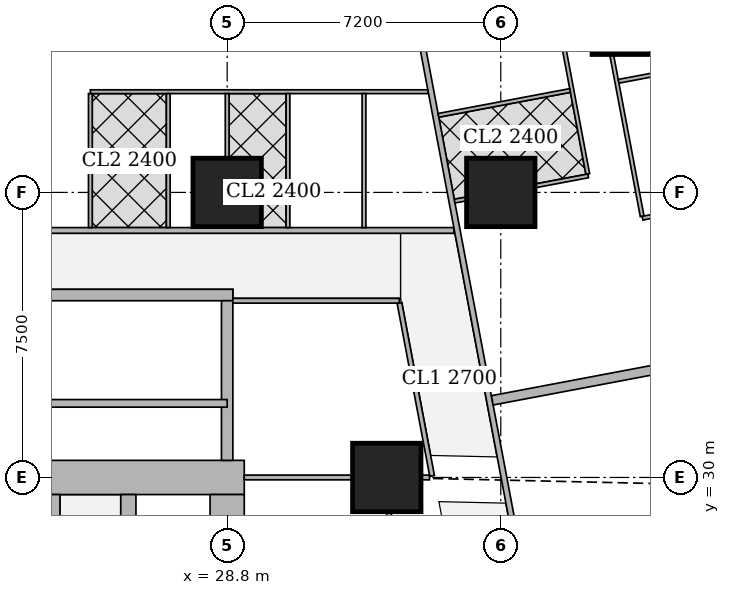
"""IFC4 building model, lengths in metres.
Left out: names, types, materials, properties, quantities, classifications, styles, units other than length and angle.
Written with IfcOpenShell. Run it as: python <this file> out.ifc"""

import sys

from ifc_helpers import new_model, si_unit, direction, frame, frame_2d, origin, origin_2d, place, context, subcontext, project, spatial, rectangle, extrude, element, fill, save


model = new_model("IFC4")
c1 = context("Model", 3, precision=1e-05, world=origin(), true_north=direction((0.0, 1.0)))
c2 = subcontext(c1, "Body", "Model", "MODEL_VIEW")
j1 = project(units=[si_unit("LENGTHUNIT", "METRE"), si_unit("PLANEANGLEUNIT", "RADIAN")], contexts=[c1])
p1 = place(None, origin())
s1 = spatial("IfcSite", under=j1, at=p1, CompositionType="ELEMENT")
p2 = place(p1, origin())
s2 = spatial("IfcBuilding", under=s1, at=p2, CompositionType="ELEMENT")
p3 = place(p2, frame((0.0, 0.0, 20.0)))
s3 = spatial("IfcBuildingStorey", under=s2, at=p3, CompositionType="ELEMENT", Elevation=20.0)
for number, where, z_axis, x_axis in (
    (1, (33.0, 30.0, 0.0), (0.0, 0.0, 1.0), (1.0, 0.0, 0.0)),
    (2, (28.8, 37.5, 0.0), (0.0, 0.0, 1.0), (1.0, 0.0, 0.0)),
    (3, (36.0, 37.5, 0.0), (0.0, 0.0, 1.0), (1.0, 0.0, 0.0)),
):
    element("IfcColumn", number, at=place(p3, frame(where, z_axis=z_axis, x_axis=x_axis)), inside=s3, PredefinedType="COLUMN", context=c2, shape_type="SweptSolid", body=[
        extrude(rectangle(XDim=1.8, YDim=1.8, at=origin_2d()), origin(), (0.0, 0.0, 1.0), 3.75),
    ])
p4 = place(p3, frame((40.102, 42.83, 0.0), z_axis=(0.0, 0.0, 1.0), x_axis=(1.0, 0.0, 0.0)))
e4 = element("IfcColumn", 4, at=p4, inside=s3, PredefinedType="COLUMN", context=c2, shape_type="SweptSolid", body=[
    extrude(rectangle(XDim=3.4, YDim=3.4, at=origin_2d()), origin(), (0.0, 0.0, 1.0), 3.75),
])
p5 = place(p3, frame((13.95, 30.0, 0.0), z_axis=(0.0, 0.0, 1.0), x_axis=(1.0, 0.0, 0.0)))
e5 = element("IfcWall", 5, at=p5, inside=s3, PredefinedType="SHEAR", context=c2, shape_type="SweptSolid", body=[
    extrude(rectangle(XDim=15.3, YDim=0.9, at=frame_2d((7.65, 0.0))), origin(), (0.0, 0.0, 1.0), 3.75),
])
p6 = place(p5, frame((4.45, 0.0, 0.0)))
e6 = element("IfcOpeningElement", 6, at=p6, cuts=e5, PredefinedType="OPENING", context=c2, shape_type="SweptSolid", body=[
    extrude(rectangle(XDim=1.8, YDim=2.1, at=frame_2d((0.9, 1.05))), frame((0.0, 0.46, 0.0), z_axis=(0.0, -1.0, 0.0), x_axis=(1.0, 0.0, 0.0)), (0.0, 0.0, 1.0), 0.92),
])
p7 = place(p5, frame((10.7, 0.0, 0.0)))
e7 = element("IfcOpeningElement", 7, at=p7, cuts=e5, PredefinedType="OPENING", context=c2, shape_type="SweptSolid", body=[
    extrude(rectangle(XDim=1.1, YDim=2.1, at=frame_2d((0.55, 1.05))), frame((0.0, 0.46, 0.0), z_axis=(0.0, -1.0, 0.0), x_axis=(1.0, 0.0, 0.0)), (0.0, 0.0, 1.0), 0.92),
])
p8 = place(p3, frame((28.8, 15.45, 0.0), z_axis=(0.0, 0.0, 1.0), x_axis=(0.0, 1.0, 0.0)))
e8 = element("IfcWall", 8, at=p8, inside=s3, PredefinedType="SHEAR", context=c2, shape_type="SweptSolid", body=[
    extrude(rectangle(XDim=14.1, YDim=0.9, at=frame_2d((7.05, 0.0))), origin(), (0.0, 0.0, 1.0), 3.75),
])
p9 = place(p3, frame((24.2, 15.45, 0.0), z_axis=(0.0, 0.0, 1.0), x_axis=(0.0, 1.0, 0.0)))
e9 = element("IfcWall", 9, at=p9, inside=s3, PredefinedType="SHEAR", context=c2, shape_type="SweptSolid", body=[
    extrude(rectangle(XDim=14.1, YDim=0.4, at=frame_2d((7.05, 0.0))), origin(), (0.0, 0.0, 1.0), 3.75),
])
p10 = place(p3, frame((26.2, 26.45, 0.0), z_axis=(0.0, 0.0, 1.0), x_axis=(0.0, 1.0, 0.0)))
e10 = element("IfcWall", 10, at=p10, inside=s3, PredefinedType="SHEAR", context=c2, shape_type="SweptSolid", body=[
    extrude(rectangle(XDim=3.1, YDim=0.4, at=frame_2d((1.55, 0.0))), origin(), (0.0, 0.0, 1.0), 3.75),
])
p11 = place(p10, frame((1.075, 0.0, 0.0)))
e11 = element("IfcOpeningElement", 11, at=p11, cuts=e10, PredefinedType="OPENING", context=c2, shape_type="SweptSolid", body=[
    extrude(rectangle(XDim=1.2, YDim=2.1, at=frame_2d((0.6, 1.05))), frame((0.0, 0.21, 0.0), z_axis=(0.0, -1.0, 0.0), x_axis=(1.0, 0.0, 0.0)), (0.0, 0.0, 1.0), 0.42),
])
p12 = place(p3, frame((21.45, 34.8, 0.0), z_axis=(0.0, 0.0, 1.0), x_axis=(1.0, 0.0, 0.0)))
e12 = element("IfcWall", 12, at=p12, inside=s3, PredefinedType="SHEAR", context=c2, shape_type="SweptSolid", body=[
    extrude(rectangle(XDim=7.5, YDim=0.3, at=frame_2d((3.75, 0.0))), origin(), (0.0, 0.0, 1.0), 3.75),
])
p13 = place(p12, frame((0.5, 0.0, 0.0)))
e13 = element("IfcOpeningElement", 13, at=p13, cuts=e12, PredefinedType="OPENING", context=c2, shape_type="SweptSolid", body=[
    extrude(rectangle(XDim=1.1, YDim=2.1, at=frame_2d((0.55, 1.05))), frame((0.0, 0.16, 0.0), z_axis=(0.0, -1.0, 0.0), x_axis=(1.0, 0.0, 0.0)), (0.0, 0.0, 1.0), 0.32),
])
p14 = place(p3, frame((28.8, 30.45, 0.0), z_axis=(0.0, 0.0, 1.0), x_axis=(0.0, 1.0, 0.0)))
e14 = element("IfcWall", 14, at=p14, inside=s3, PredefinedType="SHEAR", context=c2, shape_type="SweptSolid", body=[
    extrude(rectangle(XDim=4.2, YDim=0.3, at=frame_2d((2.1, 0.0))), origin(), (0.0, 0.0, 1.0), 3.75),
])
p15 = place(p3, frame((8.35, 36.5, 0.0), z_axis=(0.0, 0.0, 1.0), x_axis=(1.0, 0.0, 0.0)))
e15 = element("IfcWall", 15, at=p15, inside=s3, PredefinedType="SOLIDWALL", context=c2, shape_type="SweptSolid", body=[
    extrude(rectangle(XDim=26.415, YDim=0.15, at=frame_2d((13.208, 0.0))), origin(), (0.0, 0.0, 1.0), 3.5),
])
p16 = place(p15, frame((3.383, 0.0, 0.0)))
e16 = element("IfcOpeningElement", 16, at=p16, cuts=e15, PredefinedType="OPENING", context=c2, shape_type="SweptSolid", body=[
    extrude(rectangle(XDim=1.0, YDim=2.1, at=frame_2d((0.5, 1.05))), frame((0.0, 0.085, 0.0), z_axis=(0.0, -1.0, 0.0), x_axis=(1.0, 0.0, 0.0)), (0.0, 0.0, 1.0), 0.17),
])
p17 = place(p15, frame((7.65, 0.0, 0.0)))
e17 = element("IfcOpeningElement", 17, at=p17, cuts=e15, PredefinedType="OPENING", context=c2, shape_type="SweptSolid", body=[
    extrude(rectangle(XDim=1.0, YDim=2.1, at=frame_2d((0.5, 1.05))), frame((0.0, 0.085, 0.0), z_axis=(0.0, -1.0, 0.0), x_axis=(1.0, 0.0, 0.0)), (0.0, 0.0, 1.0), 0.17),
])
p18 = place(p15, frame((14.857, 0.0, 0.0)))
e18 = element("IfcOpeningElement", 18, at=p18, cuts=e15, PredefinedType="OPENING", context=c2, shape_type="SweptSolid", body=[
    extrude(rectangle(XDim=1.0, YDim=2.1, at=frame_2d((0.5, 1.05))), frame((0.0, 0.085, 0.0), z_axis=(0.0, -1.0, 0.0), x_axis=(1.0, 0.0, 0.0)), (0.0, 0.0, 1.0), 0.17),
])
p19 = place(p3, frame((33.755, 42.325, 0.0), z_axis=(0.0, 0.0, 1.0), x_axis=(0.185611461091, -0.982623216453, 0.0)))
e19 = element("IfcWall", 19, at=p19, inside=s3, PredefinedType="SOLIDWALL", context=c2, shape_type="SweptSolid", body=[
    extrude(rectangle(XDim=40.241, YDim=0.15, at=frame_2d((20.121, 0.0))), origin(), (0.0, 0.0, 1.0), 2.5),
])
p20 = place(p19, frame((7.325, 0.0, 0.0)))
e20 = element("IfcOpeningElement", 20, at=p20, cuts=e19, PredefinedType="OPENING", context=c2, shape_type="SweptSolid", body=[
    extrude(rectangle(XDim=1.0, YDim=2.1, at=frame_2d((0.5, 1.05))), frame((0.0, 0.085, 0.0), z_axis=(0.0, -1.0, 0.0), x_axis=(1.0, 0.0, 0.0)), (0.0, 0.0, 1.0), 0.17),
])
p21 = place(p19, frame((11.902, 0.0, 0.0)))
e21 = element("IfcOpeningElement", 21, at=p21, cuts=e19, PredefinedType="OPENING", context=c2, shape_type="SweptSolid", body=[
    extrude(rectangle(XDim=1.0, YDim=2.1, at=frame_2d((0.5, 1.05))), frame((0.0, 0.085, 0.0), z_axis=(0.0, -1.0, 0.0), x_axis=(1.0, 0.0, 0.0)), (0.0, 0.0, 1.0), 0.17),
])
p22 = place(p19, frame((25.718, 0.0, 0.0)))
e22 = element("IfcOpeningElement", 22, at=p22, cuts=e19, PredefinedType="OPENING", context=c2, shape_type="SweptSolid", body=[
    extrude(rectangle(XDim=1.0, YDim=2.1, at=frame_2d((0.5, 1.05))), frame((0.0, 0.085, 0.0), z_axis=(0.0, -1.0, 0.0), x_axis=(1.0, 0.0, 0.0)), (0.0, 0.0, 1.0), 0.17),
])
p23 = place(p19, frame((31.788, 0.0, 0.0)))
e23 = element("IfcOpeningElement", 23, at=p23, cuts=e19, PredefinedType="OPENING", context=c2, shape_type="SweptSolid", body=[
    extrude(rectangle(XDim=1.0, YDim=2.1, at=frame_2d((0.5, 1.05))), frame((0.0, 0.085, 0.0), z_axis=(0.0, -1.0, 0.0), x_axis=(1.0, 0.0, 0.0)), (0.0, 0.0, 1.0), 0.17),
])
p24 = place(p3, frame((38.918, 41.12, 0.0), z_axis=(0.0, 0.0, 1.0), x_axis=(0.185474723155, -0.982649035552, 0.0)))
e24 = element("IfcWall", 24, at=p24, inside=s3, PredefinedType="PARTITIONING", context=c2, shape_type="SweptSolid", body=[
    extrude(rectangle(XDim=4.324, YDim=0.1, at=frame_2d((2.162, 0.0))), origin(), (0.0, 0.0, 1.0), 3.5),
])
p25 = place(p24, frame((1.6, 0.0, 0.0)))
e25 = element("IfcOpeningElement", 25, at=p25, cuts=e24, PredefinedType="OPENING", context=c2, shape_type="SweptSolid", body=[
    extrude(rectangle(XDim=0.9, YDim=2.1, at=frame_2d((0.45, 1.05))), frame((0.0, 0.06, 0.0), z_axis=(0.0, -1.0, 0.0), x_axis=(1.0, 0.0, 0.0)), (0.0, 0.0, 1.0), 0.12),
])
p26 = place(p3, frame((37.457, 42.39, 0.0), z_axis=(0.0, 0.0, 1.0), x_axis=(0.185560627322, -0.982632817276, 0.0)))
e26 = element("IfcWall", 26, at=p26, inside=s3, PredefinedType="PARTITIONING", context=c2, shape_type="SweptSolid", body=[
    extrude(rectangle(XDim=4.484, YDim=0.1, at=frame_2d((2.242, 0.0))), origin(), (0.0, 0.0, 1.0), 3.5),
])
p27 = place(p26, frame((2.936, 0.0, 0.0)))
e27 = element("IfcOpeningElement", 27, at=p27, cuts=e26, PredefinedType="OPENING", context=c2, shape_type="SweptSolid", body=[
    extrude(rectangle(XDim=0.9, YDim=2.1, at=frame_2d((0.45, 1.05))), frame((0.0, 0.06, 0.0), z_axis=(0.0, -1.0, 0.0), x_axis=(1.0, 0.0, 0.0)), (0.0, 0.0, 1.0), 0.12),
])
p28 = place(p3, frame((43.277, 41.212, 0.0), z_axis=(0.0, 0.0, 1.0), x_axis=(-0.982665405803, -0.185387972203, 0.0)))
e28 = element("IfcWall", 28, at=p28, inside=s3, PredefinedType="PARTITIONING", context=c2, shape_type="SweptSolid", body=[
    extrude(rectangle(XDim=4.25, YDim=0.1, at=frame_2d((2.125, 0.0))), origin(), (0.0, 0.0, 1.0), 2.1),
])
p29 = place(p3, frame((40.454, 36.959, 0.0), z_axis=(0.0, 0.0, 1.0), x_axis=(-0.982578421631, -0.185848447247, 0.0)))
e29 = element("IfcWall", 29, at=p29, inside=s3, PredefinedType="PARTITIONING", context=c2, shape_type="SweptSolid", body=[
    extrude(rectangle(XDim=0.737, YDim=0.1, at=frame_2d((0.369, 0.0))), origin(), (0.0, 0.0, 1.0), 3.5),
])
p30 = place(p3, frame((37.823, 40.182, 0.0), z_axis=(0.0, 0.0, 1.0), x_axis=(-0.98263926043, -0.185526504472, 0.0)))
e30 = element("IfcWall", 30, at=p30, inside=s3, PredefinedType="PARTITIONING", context=c2, shape_type="SweptSolid", body=[
    extrude(rectangle(XDim=3.524, YDim=0.1, at=frame_2d((1.762, 0.0))), origin(), (0.0, 0.0, 1.0), 3.5),
])
p31 = place(p3, frame((38.299, 37.935, 0.0), z_axis=(0.0, 0.0, 1.0), x_axis=(-0.982680053146, -0.185310315822, 0.0)))
e31 = element("IfcWall", 31, at=p31, inside=s3, PredefinedType="PARTITIONING", context=c2, shape_type="SweptSolid", body=[
    extrude(rectangle(XDim=1.414, YDim=0.1, at=frame_2d((0.707, 0.0))), origin(), (0.0, 0.0, 1.0), 3.5),
])
p32 = place(p3, frame((35.09, 37.328, 0.0), z_axis=(0.0, 0.0, 1.0), x_axis=(-0.982961380226, -0.183812200315, 0.0)))
e32 = element("IfcWall", 32, at=p32, inside=s3, PredefinedType="PARTITIONING", context=c2, shape_type="SweptSolid", body=[
    extrude(rectangle(XDim=0.31, YDim=0.1, at=frame_2d((0.155, 0.0))), origin(), (0.0, 0.0, 1.0), 3.5),
])
p33 = place(p3, frame((40.468, 32.915, 0.0), z_axis=(0.0, 0.0, 1.0), x_axis=(-0.982635807605, -0.185544791394, 0.0)))
e33 = element("IfcWall", 33, at=p33, inside=s3, PredefinedType="SOLIDWALL", context=c2, shape_type="SweptSolid", body=[
    extrude(rectangle(XDim=4.775, YDim=0.25, at=frame_2d((2.388, 0.0))), origin(), (0.0, 0.0, 1.0), 3.5),
])
p34 = place(p3, frame((25.2, 40.15, 0.0), z_axis=(0.0, 0.0, 1.0), x_axis=(1.0, 0.0, 0.0)))
e34 = element("IfcWall", 34, at=p34, inside=s3, PredefinedType="PARTITIONING", context=c2, shape_type="SweptSolid", body=[
    extrude(rectangle(XDim=8.88, YDim=0.1, at=frame_2d((4.44, 0.0))), origin(), (0.0, 0.0, 1.0), 3.5),
])
p35 = place(p34, frame((0.575, 0.0, 0.0)))
e35 = element("IfcOpeningElement", 35, at=p35, cuts=e34, PredefinedType="OPENING", context=c2, shape_type="SweptSolid", body=[
    extrude(rectangle(XDim=0.9, YDim=2.1, at=frame_2d((0.45, 1.05))), frame((0.0, 0.06, 0.0), z_axis=(0.0, -1.0, 0.0), x_axis=(1.0, 0.0, 0.0)), (0.0, 0.0, 1.0), 0.12),
])
p36 = place(p34, frame((3.95, 0.0, 0.0)))
e36 = element("IfcOpeningElement", 36, at=p36, cuts=e34, PredefinedType="OPENING", context=c2, shape_type="SweptSolid", body=[
    extrude(rectangle(XDim=0.9, YDim=2.1, at=frame_2d((0.45, 1.05))), frame((0.0, 0.06, 0.0), z_axis=(0.0, -1.0, 0.0), x_axis=(1.0, 0.0, 0.0)), (0.0, 0.0, 1.0), 0.12),
])
p37 = place(p34, frame((7.83, 0.0, 0.0)))
e37 = element("IfcOpeningElement", 37, at=p37, cuts=e34, PredefinedType="OPENING", context=c2, shape_type="SweptSolid", body=[
    extrude(rectangle(XDim=0.9, YDim=2.1, at=frame_2d((0.45, 1.05))), frame((0.0, 0.06, 0.0), z_axis=(0.0, -1.0, 0.0), x_axis=(1.0, 0.0, 0.0)), (0.0, 0.0, 1.0), 0.12),
])
p38 = place(p34, frame((2.375, 0.0, 0.0)))
e38 = element("IfcOpeningElement", 38, at=p38, cuts=e34, PredefinedType="OPENING", context=c2, shape_type="SweptSolid", body=[
    extrude(rectangle(XDim=0.9, YDim=2.1, at=frame_2d((0.45, 1.05))), frame((0.0, 0.06, 0.0), z_axis=(0.0, -1.0, 0.0), x_axis=(1.0, 0.0, 0.0)), (0.0, 0.0, 1.0), 0.12),
])
p39 = place(p34, frame((5.75, 0.0, 0.0)))
e39 = element("IfcOpeningElement", 39, at=p39, cuts=e34, PredefinedType="OPENING", context=c2, shape_type="SweptSolid", body=[
    extrude(rectangle(XDim=0.9, YDim=2.1, at=frame_2d((0.45, 1.05))), frame((0.0, 0.06, 0.0), z_axis=(0.0, -1.0, 0.0), x_axis=(1.0, 0.0, 0.0)), (0.0, 0.0, 1.0), 0.12),
])
p40 = place(p3, frame((25.2, 36.575, 0.0), z_axis=(0.0, 0.0, 1.0), x_axis=(0.0, 1.0, 0.0)))
e40 = element("IfcWall", 40, at=p40, inside=s3, PredefinedType="PARTITIONING", context=c2, shape_type="SweptSolid", body=[
    extrude(rectangle(XDim=3.525, YDim=0.1, at=frame_2d((1.763, 0.0))), origin(), (0.0, 0.0, 1.0), 3.5),
])
p41 = place(p3, frame((28.8, 38.401, 0.0), z_axis=(0.0, 0.0, 1.0), x_axis=(0.0, 1.0, 0.0)))
e41 = element("IfcWall", 41, at=p41, inside=s3, PredefinedType="PARTITIONING", context=c2, shape_type="SweptSolid", body=[
    extrude(rectangle(XDim=1.699, YDim=0.1, at=frame_2d((0.85, 0.0))), origin(), (0.0, 0.0, 1.0), 3.5),
])
for number, where, z_axis, x_axis in (
    (42, (32.4, 36.575, 0.0), (0.0, 0.0, 1.0), (0.0, 1.0, 0.0)),
    (43, (27.25, 36.575, 0.0), (0.0, 0.0, 1.0), (0.0, 1.0, 0.0)),
    (44, (30.4, 36.575, 0.0), (0.0, 0.0, 1.0), (0.0, 1.0, 0.0)),
):
    element("IfcWall", number, at=place(p3, frame(where, z_axis=z_axis, x_axis=x_axis)), inside=s3, PredefinedType="PARTITIONING", context=c2, shape_type="SweptSolid", body=[
        extrude(rectangle(XDim=3.525, YDim=0.1, at=frame_2d((1.763, 0.0))), origin(), (0.0, 0.0, 1.0), 3.5),
    ])
p42 = place(p3, frame((28.95, 34.65, 0.0), z_axis=(0.0, 0.0, 1.0), x_axis=(1.0, 0.0, 0.0)))
e45 = element("IfcWall", 45, at=p42, inside=s3, PredefinedType="PARTITIONING", context=c2, shape_type="SweptSolid", body=[
    extrude(rectangle(XDim=4.381, YDim=0.125, at=frame_2d((2.19, 0.0))), origin(), (0.0, 0.0, 1.0), 3.5),
])
p43 = place(p3, frame((34.193, 30.04, 0.0), z_axis=(0.0, 0.0, 1.0), x_axis=(-0.185626015863, 0.982620467034, 0.0)))
e46 = element("IfcWall", 46, at=p43, inside=s3, PredefinedType="PARTITIONING", context=c2, shape_type="SweptSolid", body=[
    extrude(rectangle(XDim=4.628, YDim=0.125, at=frame_2d((2.314, 0.0))), origin(), (0.0, 0.0, 1.0), 2.5),
])
p44 = place(p43, frame((1.15, 0.0, 0.0)))
e47 = element("IfcOpeningElement", 47, at=p44, cuts=e46, PredefinedType="OPENING", context=c2, shape_type="SweptSolid", body=[
    extrude(rectangle(XDim=1.0, YDim=2.1, at=frame_2d((0.5, 1.05))), frame((0.0, 0.073, 0.0), z_axis=(0.0, -1.0, 0.0), x_axis=(1.0, 0.0, 0.0)), (0.0, 0.0, 1.0), 0.145),
])
p45 = place(p3, frame((34.28, 22.574, 0.0), z_axis=(0.0, 0.0, 1.0), x_axis=(-0.185713862218, 0.982603867986, 0.0)))
e48 = element("IfcWall", 48, at=p45, inside=s3, PredefinedType="PARTITIONING", context=c2, shape_type="SweptSolid", body=[
    extrude(rectangle(XDim=6.628, YDim=0.125, at=frame_2d((3.314, 0.0))), origin(), (0.0, 0.0, 1.0), 2.5),
])
p46 = place(p45, frame((3.241, 0.0, 0.0)))
e49 = element("IfcOpeningElement", 49, at=p46, cuts=e48, PredefinedType="OPENING", context=c2, shape_type="SweptSolid", body=[
    extrude(rectangle(XDim=1.0, YDim=2.1, at=frame_2d((0.5, 1.05))), frame((0.0, 0.073, 0.0), z_axis=(0.0, -1.0, 0.0), x_axis=(1.0, 0.0, 0.0)), (0.0, 0.0, 1.0), 0.145),
])
p47 = place(p3, frame((29.25, 30.0, 0.0), z_axis=(0.0, 0.0, 1.0), x_axis=(1.0, 0.0, 0.0)))
e50 = element("IfcWall", 50, at=p47, inside=s3, PredefinedType="PARTITIONING", context=c2, shape_type="SweptSolid", body=[
    extrude(rectangle(XDim=2.849, YDim=0.125, at=frame_2d((1.425, 0.0))), origin(), (0.0, 0.0, 1.0), 3.5),
])
p48 = place(p3, frame((33.901, 30.0, 0.0), z_axis=(0.0, 0.0, 1.0), x_axis=(1.0, 0.0, 0.0)))
e51 = element("IfcWall", 51, at=p48, inside=s3, PredefinedType="PARTITIONING", context=c2, shape_type="SweptSolid", body=[
    extrude(rectangle(XDim=0.224, YDim=0.125, at=frame_2d((0.112, 0.0))), origin(), (0.0, 0.0, 1.0), 2.5),
])
p49 = place(p3, frame((23.0, 31.95, 0.0), z_axis=(0.0, 0.0, 1.0), x_axis=(1.0, 0.0, 0.0)))
e52 = element("IfcWall", 52, at=p49, inside=s3, PredefinedType="SHEAR", context=c2, shape_type="SweptSolid", body=[
    extrude(rectangle(XDim=5.8, YDim=0.2, at=frame_2d((2.9, 0.0))), origin(), (0.0, 0.0, 1.0), 3.75),
])
p50 = place(p25, origin())
e53 = element("IfcDoor", 53, at=p50, inside=s3, OperationType="SINGLE_SWING_LEFT", PredefinedType="DOOR", context=c2, shape_type="SweptSolid", body=[
    extrude(rectangle(XDim=0.9, YDim=2.1, at=frame_2d((0.45, 1.05))), frame((0.0, 0.025, 0.0), z_axis=(0.0, -1.0, 0.0), x_axis=(1.0, 0.0, 0.0)), (0.0, 0.0, 1.0), 0.05),
])
fill(e25, e53)
p51 = place(p27, origin())
e54 = element("IfcDoor", 54, at=p51, inside=s3, OperationType="SINGLE_SWING_LEFT", PredefinedType="DOOR", context=c2, shape_type="SweptSolid", body=[
    extrude(rectangle(XDim=0.9, YDim=2.1, at=frame_2d((0.45, 1.05))), frame((0.0, 0.025, 0.0), z_axis=(0.0, -1.0, 0.0), x_axis=(1.0, 0.0, 0.0)), (0.0, 0.0, 1.0), 0.05),
])
fill(e27, e54)
p52 = place(p20, origin())
e55 = element("IfcDoor", 55, at=p52, inside=s3, OperationType="SINGLE_SWING_RIGHT", PredefinedType="DOOR", context=c2, shape_type="SweptSolid", body=[
    extrude(rectangle(XDim=1.0, YDim=2.1, at=frame_2d((0.5, 1.05))), frame((0.0, 0.025, 0.0), z_axis=(0.0, -1.0, 0.0), x_axis=(1.0, 0.0, 0.0)), (0.0, 0.0, 1.0), 0.05),
])
fill(e20, e55)
p53 = place(p21, origin())
e56 = element("IfcDoor", 56, at=p53, inside=s3, OperationType="SINGLE_SWING_LEFT", PredefinedType="DOOR", context=c2, shape_type="SweptSolid", body=[
    extrude(rectangle(XDim=1.0, YDim=2.1, at=frame_2d((0.5, 1.05))), frame((0.0, 0.025, 0.0), z_axis=(0.0, -1.0, 0.0), x_axis=(1.0, 0.0, 0.0)), (0.0, 0.0, 1.0), 0.05),
])
fill(e21, e56)
p54 = place(p35, origin())
e57 = element("IfcDoor", 57, at=p54, inside=s3, OperationType="SINGLE_SWING_RIGHT", PredefinedType="DOOR", context=c2, shape_type="SweptSolid", body=[
    extrude(rectangle(XDim=0.9, YDim=2.1, at=frame_2d((0.45, 1.05))), frame((0.0, 0.025, 0.0), z_axis=(0.0, -1.0, 0.0), x_axis=(1.0, 0.0, 0.0)), (0.0, 0.0, 1.0), 0.05),
])
fill(e35, e57)
p55 = place(p36, origin())
e58 = element("IfcDoor", 58, at=p55, inside=s3, OperationType="SINGLE_SWING_LEFT", PredefinedType="DOOR", context=c2, shape_type="SweptSolid", body=[
    extrude(rectangle(XDim=0.9, YDim=2.1, at=frame_2d((0.45, 1.05))), frame((0.0, 0.025, 0.0), z_axis=(0.0, -1.0, 0.0), x_axis=(1.0, 0.0, 0.0)), (0.0, 0.0, 1.0), 0.05),
])
fill(e36, e58)
p56 = place(p37, origin())
e59 = element("IfcDoor", 59, at=p56, inside=s3, OperationType="SINGLE_SWING_LEFT", PredefinedType="DOOR", context=c2, shape_type="SweptSolid", body=[
    extrude(rectangle(XDim=0.9, YDim=2.1, at=frame_2d((0.45, 1.05))), frame((0.0, 0.025, 0.0), z_axis=(0.0, -1.0, 0.0), x_axis=(1.0, 0.0, 0.0)), (0.0, 0.0, 1.0), 0.05),
])
fill(e37, e59)
p57 = place(p38, origin())
e60 = element("IfcDoor", 60, at=p57, inside=s3, OperationType="SINGLE_SWING_RIGHT", PredefinedType="DOOR", context=c2, shape_type="SweptSolid", body=[
    extrude(rectangle(XDim=0.9, YDim=2.1, at=frame_2d((0.45, 1.05))), frame((0.0, 0.025, 0.0), z_axis=(0.0, -1.0, 0.0), x_axis=(1.0, 0.0, 0.0)), (0.0, 0.0, 1.0), 0.05),
])
fill(e38, e60)
p58 = place(p39, origin())
e61 = element("IfcDoor", 61, at=p58, inside=s3, OperationType="SINGLE_SWING_RIGHT", PredefinedType="DOOR", context=c2, shape_type="SweptSolid", body=[
    extrude(rectangle(XDim=0.9, YDim=2.1, at=frame_2d((0.45, 1.05))), frame((0.0, 0.025, 0.0), z_axis=(0.0, -1.0, 0.0), x_axis=(1.0, 0.0, 0.0)), (0.0, 0.0, 1.0), 0.05),
])
fill(e39, e61)
p59 = place(p18, origin())
e62 = element("IfcDoor", 62, at=p59, inside=s3, OperationType="SINGLE_SWING_RIGHT", PredefinedType="DOOR", context=c2, shape_type="SweptSolid", body=[
    extrude(rectangle(XDim=1.0, YDim=2.1, at=frame_2d((0.5, 1.05))), frame((0.0, 0.025, 0.0), z_axis=(0.0, -1.0, 0.0), x_axis=(1.0, 0.0, 0.0)), (0.0, 0.0, 1.0), 0.05),
])
fill(e18, e62)
p60 = place(p44, origin())
e63 = element("IfcDoor", 63, at=p60, inside=s3, OperationType="SINGLE_SWING_LEFT", PredefinedType="DOOR", context=c2, shape_type="SweptSolid", body=[
    extrude(rectangle(XDim=1.0, YDim=2.1, at=frame_2d((0.5, 1.05))), frame((0.0, 0.025, 0.0), z_axis=(0.0, -1.0, 0.0), x_axis=(1.0, 0.0, 0.0)), (0.0, 0.0, 1.0), 0.05),
])
fill(e47, e63)
p61 = place(p7, origin())
e64 = element("IfcDoor", 64, at=p61, inside=s3, OperationType="SINGLE_SWING_RIGHT", PredefinedType="DOOR", context=c2, shape_type="SweptSolid", body=[
    extrude(rectangle(XDim=1.1, YDim=2.1, at=frame_2d((0.55, 1.05))), frame((0.0, 0.025, 0.0), z_axis=(0.0, -1.0, 0.0), x_axis=(1.0, 0.0, 0.0)), (0.0, 0.0, 1.0), 0.05),
])
fill(e7, e64)
save(model, sys.argv[1])
